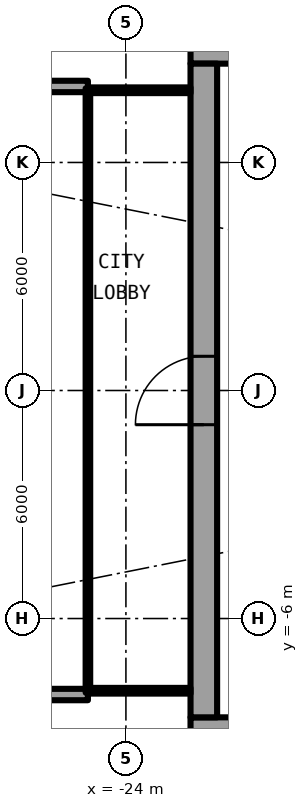
"""IFC4 building model, lengths in metres.
Left out: names, types, materials, properties, quantities, classifications, styles, units other than length and angle.
Written with IfcOpenShell. Run it as: python <this file> out.ifc"""

import sys

from ifc_helpers import new_model, si_unit, direction, frame, frame_2d, origin, place, context, subcontext, project, spatial, rectangle, extrude, element, fill, save


model = new_model("IFC4")
c1 = context("Model", 3, precision=1e-05, world=origin(), true_north=direction((0.0, 1.0)))
c2 = subcontext(c1, "Body", "Model", "MODEL_VIEW")
j1 = project(units=[si_unit("LENGTHUNIT", "METRE"), si_unit("PLANEANGLEUNIT", "RADIAN")], contexts=[c1])
p1 = place(None, origin())
s1 = spatial("IfcSite", under=j1, at=p1, CompositionType="ELEMENT")
p2 = place(p1, origin())
s2 = spatial("IfcBuilding", under=s1, at=p2, CompositionType="ELEMENT")
p3 = place(p2, frame((0.0, 0.0, 81.9)))
s3 = spatial("IfcBuildingStorey", under=s2, at=p3, CompositionType="ELEMENT", Elevation=81.9)
for number, where, z_axis, x_axis in (
    (1, (-25.0, 8.0, 0.0), (0.0, 0.0, 1.0), (-1.0, 0.0, 0.0)),
    (2, (-25.0, -8.0, 0.0), (0.0, 0.0, 1.0), (-1.0, 0.0, 0.0)),
):
    element("IfcWall", number, at=place(p3, frame(where, z_axis=z_axis, x_axis=x_axis)), inside=s3, PredefinedType="SOLIDWALL", context=c2, shape_type="SweptSolid", body=[
        extrude(rectangle(XDim=2.667, YDim=0.3, at=frame_2d((1.333, 0.0))), origin(), (0.0, 0.0, 1.0), 2.7),
    ])
p4 = place(p3, frame((-22.3, -8.95, 0.0), z_axis=(0.0, 0.0, 1.0), x_axis=(1.0, 0.0, 0.0)))
e3 = element("IfcWall", 3, at=p4, inside=s3, PredefinedType="SHEAR", context=c2, shape_type="SweptSolid", body=[
    extrude(rectangle(XDim=14.0, YDim=0.7, at=frame_2d((7.0, 0.0))), origin(), (0.0, 0.0, 1.0), 3.05),
])
p5 = place(p4, frame((1.225, 0.0, 0.0)))
e4 = element("IfcOpeningElement", 4, at=p5, cuts=e3, PredefinedType="OPENING", context=c2, shape_type="SweptSolid", body=[
    extrude(rectangle(XDim=1.2, YDim=2.3, at=frame_2d((0.6, 1.15))), frame((0.0, 0.36, 0.0), z_axis=(0.0, -1.0, 0.0), x_axis=(1.0, 0.0, 0.0)), (0.0, 0.0, 1.0), 0.72),
])
p6 = place(p3, frame((-8.3, 8.95, 0.0), z_axis=(0.0, 0.0, 1.0), x_axis=(-1.0, 0.0, 0.0)))
e5 = element("IfcWall", 5, at=p6, inside=s3, PredefinedType="SHEAR", context=c2, shape_type="SweptSolid", body=[
    extrude(rectangle(XDim=14.0, YDim=0.7, at=frame_2d((7.0, 0.0))), origin(), (0.0, 0.0, 1.0), 3.05),
])
p7 = place(p6, frame((11.575, 0.0, 0.0)))
e6 = element("IfcOpeningElement", 6, at=p7, cuts=e5, PredefinedType="OPENING", context=c2, shape_type="SweptSolid", body=[
    extrude(rectangle(XDim=1.2, YDim=2.3, at=frame_2d((0.6, 1.15))), frame((0.0, 0.36, 0.0), z_axis=(0.0, -1.0, 0.0), x_axis=(1.0, 0.0, 0.0)), (0.0, 0.0, 1.0), 0.72),
])
p8 = place(p3, frame((-21.95, -8.6, 0.0), z_axis=(0.0, 0.0, 1.0), x_axis=(0.0, 1.0, 0.0)))
e7 = element("IfcWall", 7, at=p8, inside=s3, PredefinedType="SHEAR", context=c2, shape_type="SweptSolid", body=[
    extrude(rectangle(XDim=17.2, YDim=0.7, at=frame_2d((8.6, 0.0))), origin(), (0.0, 0.0, 1.0), 3.05),
])
p9 = place(p8, frame((7.7, 0.0, 0.0)))
e8 = element("IfcOpeningElement", 8, at=p9, cuts=e7, PredefinedType="OPENING", context=c2, shape_type="SweptSolid", body=[
    extrude(rectangle(XDim=1.8, YDim=2.3, at=frame_2d((0.9, 1.15))), frame((0.0, 0.36, 0.0), z_axis=(0.0, -1.0, 0.0), x_axis=(1.0, 0.0, 0.0)), (0.0, 0.0, 1.0), 0.72),
])
for number, where, z_axis, x_axis in (
    (9, (-22.3, 7.9, 0.0), (0.0, 0.0, 1.0), (-1.0, 0.0, 0.0)),
    (10, (-22.3, -7.9, 0.0), (0.0, 0.0, 1.0), (-1.0, 0.0, 0.0)),
):
    element("IfcWall", number, at=place(p3, frame(where, z_axis=z_axis, x_axis=x_axis)), inside=s3, PredefinedType="PARTITIONING", context=c2, shape_type="SweptSolid", body=[
        extrude(rectangle(XDim=2.64, YDim=0.15, at=frame_2d((1.32, 0.0))), origin(), (0.0, 0.0, 1.0), 2.7),
    ])
p10 = place(p3, frame((-25.0, 7.95, 0.0), z_axis=(0.0, 0.0, 1.0), x_axis=(0.0, -1.0, 0.0)))
e11 = element("IfcWall", 11, at=p10, inside=s3, PredefinedType="PARTITIONING", context=c2, shape_type="SweptSolid", body=[
    extrude(rectangle(XDim=15.9, YDim=0.12, at=frame_2d((7.95, 0.0))), origin(), (0.0, 0.0, 1.0), 2.7),
])
p11 = place(p10, frame((0.95, 0.0, 0.1)))
e12 = element("IfcOpeningElement", 12, at=p11, cuts=e11, PredefinedType="OPENING", context=c2, shape_type="SweptSolid", body=[
    extrude(rectangle(XDim=14.0, YDim=2.35, at=frame_2d((7.0, 1.175))), frame((0.0, 0.07, 0.0), z_axis=(0.0, -1.0, 0.0), x_axis=(1.0, 0.0, 0.0)), (0.0, 0.0, 1.0), 0.14),
])
p12 = place(p9, origin())
e13 = element("IfcDoor", 13, at=p12, inside=s3, OperationType="SINGLE_SWING_LEFT", PredefinedType="DOOR", context=c2, shape_type="SweptSolid", body=[
    extrude(rectangle(XDim=1.8, YDim=2.3, at=frame_2d((0.9, 1.15))), frame((0.0, 0.025, 0.0), z_axis=(0.0, -1.0, 0.0), x_axis=(1.0, 0.0, 0.0)), (0.0, 0.0, 1.0), 0.05),
])
fill(e8, e13)
p13 = place(p11, origin())
e14 = element("IfcWindow", 14, at=p13, inside=s3, PartitioningType="SINGLE_PANEL", PredefinedType="WINDOW", context=c2, shape_type="SweptSolid", body=[
    extrude(rectangle(XDim=14.0, YDim=2.35, at=frame_2d((7.0, 1.175))), frame((0.0, 0.03, 0.0), z_axis=(0.0, -1.0, 0.0), x_axis=(1.0, 0.0, 0.0)), (0.0, 0.0, 1.0), 0.06),
])
fill(e12, e14)
save(model, sys.argv[1])
